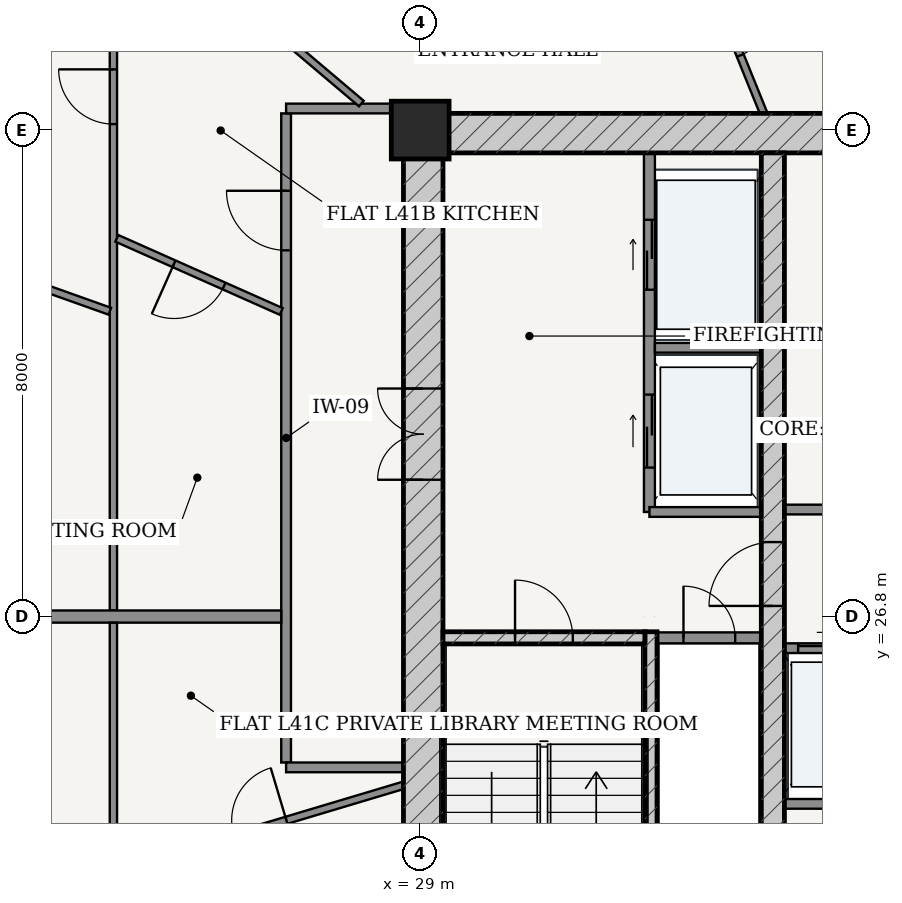
"""IFC4 building model, lengths in metres.
Left out: names, types, materials, properties, quantities, classifications, styles, units other than length and angle.
Written with IfcOpenShell. Run it as: python <this file> out.ifc"""

import sys

from ifc_helpers import new_model, si_unit, direction, frame, frame_2d, origin, origin_2d, place, context, subcontext, project, spatial, rectangle, extrude, source, transform, mapped, element, fill, save


model = new_model("IFC4")
c1 = context("Model", 3, precision=1e-05, world=origin(), true_north=direction((-0.2419218956, 0.970295726276)))
c2 = subcontext(c1, "Body", "Model", "MODEL_VIEW")
j1 = project(units=[si_unit("LENGTHUNIT", "METRE"), si_unit("PLANEANGLEUNIT", "RADIAN")], contexts=[c1])
p1 = place(None, origin())
s1 = spatial("IfcSite", under=j1, at=p1, CompositionType="ELEMENT")
p2 = place(p1, origin())
s2 = spatial("IfcBuilding", under=s1, at=p2, CompositionType="ELEMENT")
p3 = place(p2, frame((0.0, 0.0, 157.0)))
s3 = spatial("IfcBuildingStorey", under=s2, at=p3, CompositionType="ELEMENT", Elevation=157.0)
p4 = place(p3, frame((29.0, 34.8, 0.0), z_axis=(0.0, 0.0, 1.0), x_axis=(1.0, 0.0, 0.0)))
e1 = element("IfcColumn", 1, at=p4, inside=s3, PredefinedType="COLUMN", context=c2, shape_type="SweptSolid", body=[
    extrude(rectangle(XDim=0.95, YDim=0.95, at=origin_2d()), origin(), (0.0, 0.0, 1.0), 3.6),
])
p5 = place(p3, frame((28.725, 34.75, 0.0), z_axis=(0.0, 0.0, 1.0), x_axis=(1.0, 0.0, 0.0)))
e2 = element("IfcWall", 2, at=p5, inside=s3, PredefinedType="SHEAR", context=c2, shape_type="SweptSolid", body=[
    extrude(rectangle(XDim=18.55, YDim=0.65, at=frame_2d((9.275, 0.0))), origin(), (0.0, 0.0, 1.0), 3.33),
])
p6 = place(p3, frame((29.05, 19.175, 0.0), z_axis=(0.0, 0.0, 1.0), x_axis=(0.0, 1.0, 0.0)))
e3 = element("IfcWall", 3, at=p6, inside=s3, PredefinedType="SHEAR", context=c2, shape_type="SweptSolid", body=[
    extrude(rectangle(XDim=15.25, YDim=0.65, at=frame_2d((7.625, 0.0))), origin(), (0.0, 0.0, 1.0), 3.33),
])
p7 = place(p6, frame((9.875, 0.0, 0.0)))
e4 = element("IfcOpeningElement", 4, at=p7, cuts=e3, PredefinedType="OPENING", context=c2, shape_type="SweptSolid", body=[
    extrude(rectangle(XDim=1.5, YDim=2.2, at=frame_2d((0.75, 1.1))), frame((0.0, 0.335, 0.0), z_axis=(0.0, -1.0, 0.0), x_axis=(1.0, 0.0, 0.0)), (0.0, 0.0, 1.0), 0.67),
])
p8 = place(p3, frame((32.795, 19.175, 0.0), z_axis=(0.0, 0.0, 1.0), x_axis=(0.0, 1.0, 0.0)))
e5 = element("IfcWall", 5, at=p8, inside=s3, PredefinedType="SOLIDWALL", context=c2, shape_type="SweptSolid", body=[
    extrude(rectangle(XDim=7.375, YDim=0.2, at=frame_2d((3.688, 0.0))), origin(), (0.0, 0.0, 1.0), 3.33),
])
p9 = place(p3, frame((29.375, 26.45, 0.0), z_axis=(0.0, 0.0, 1.0), x_axis=(1.0, 0.0, 0.0)))
e6 = element("IfcWall", 6, at=p9, inside=s3, PredefinedType="SOLIDWALL", context=c2, shape_type="SweptSolid", body=[
    extrude(rectangle(XDim=3.32, YDim=0.2, at=frame_2d((1.66, 0.0))), origin(), (0.0, 0.0, 1.0), 3.33),
])
p10 = place(p9, frame((1.185, 0.0, 0.0)))
e7 = element("IfcOpeningElement", 7, at=p10, cuts=e6, PredefinedType="OPENING", context=c2, shape_type="SweptSolid", body=[
    extrude(rectangle(XDim=0.95, YDim=2.15, at=frame_2d((0.475, 1.075))), frame((0.0, 0.11, 0.0), z_axis=(0.0, -1.0, 0.0), x_axis=(1.0, 0.0, 0.0)), (0.0, 0.0, 1.0), 0.22),
])
p11 = place(p3, frame((34.8, 19.175, 0.0), z_axis=(0.0, 0.0, 1.0), x_axis=(0.0, 1.0, 0.0)))
e8 = element("IfcWall", 8, at=p11, inside=s3, PredefinedType="SHEAR", context=c2, shape_type="SweptSolid", body=[
    extrude(rectangle(XDim=15.25, YDim=0.38, at=frame_2d((7.625, 0.0))), origin(), (0.0, 0.0, 1.0), 3.33),
])
p12 = place(p11, frame((7.8, 0.0, 0.0)))
e9 = element("IfcOpeningElement", 9, at=p12, cuts=e8, PredefinedType="OPENING", context=c2, shape_type="SweptSolid", body=[
    extrude(rectangle(XDim=1.05, YDim=2.15, at=frame_2d((0.525, 1.075))), frame((0.0, 0.2, 0.0), z_axis=(0.0, -1.0, 0.0), x_axis=(1.0, 0.0, 0.0)), (0.0, 0.0, 1.0), 0.4),
])
p13 = place(p3, frame((32.9, 26.45, 0.0), z_axis=(0.0, 0.0, 1.0), x_axis=(1.0, 0.0, 0.0)))
e10 = element("IfcWall", 10, at=p13, inside=s3, PredefinedType="PARTITIONING", context=c2, shape_type="SweptSolid", body=[
    extrude(rectangle(XDim=1.71, YDim=0.18, at=frame_2d((0.855, 0.0))), origin(), (0.0, 0.0, 1.0), 3.33),
])
p14 = place(p13, frame((0.43, 0.0, 0.0)))
e11 = element("IfcOpeningElement", 11, at=p14, cuts=e10, PredefinedType="OPENING", context=c2, shape_type="SweptSolid", body=[
    extrude(rectangle(XDim=0.85, YDim=2.1, at=frame_2d((0.425, 1.05))), frame((0.0, 0.1, 0.0), z_axis=(0.0, -1.0, 0.0), x_axis=(1.0, 0.0, 0.0)), (0.0, 0.0, 1.0), 0.2),
])
p15 = place(p3, frame((32.77, 28.52, 0.0), z_axis=(0.0, 0.0, 1.0), x_axis=(0.0, 1.0, 0.0)))
e12 = element("IfcWall", 12, at=p15, inside=s3, PredefinedType="PARTITIONING", context=c2, shape_type="SweptSolid", body=[
    extrude(rectangle(XDim=5.905, YDim=0.18, at=frame_2d((2.953, 0.0))), origin(), (0.0, 0.0, 1.0), 3.33),
])
p16 = place(p15, frame((3.655, 0.0, 0.0)))
e13 = element("IfcOpeningElement", 13, at=p16, cuts=e12, PredefinedType="OPENING", context=c2, shape_type="SweptSolid", body=[
    extrude(rectangle(XDim=1.15, YDim=2.2, at=frame_2d((0.575, 1.1))), frame((0.0, 0.1, 0.0), z_axis=(0.0, -1.0, 0.0), x_axis=(1.0, 0.0, 0.0)), (0.0, 0.0, 1.0), 0.2),
])
p17 = place(p15, frame((0.73, 0.0, 0.0)))
e14 = element("IfcOpeningElement", 14, at=p17, cuts=e12, PredefinedType="OPENING", context=c2, shape_type="SweptSolid", body=[
    extrude(rectangle(XDim=1.2, YDim=2.25, at=frame_2d((0.6, 1.125))), frame((0.0, 0.1, 0.0), z_axis=(0.0, -1.0, 0.0), x_axis=(1.0, 0.0, 0.0)), (0.0, 0.0, 1.0), 0.2),
])
p18 = place(p3, frame((32.86, 31.22, 0.0), z_axis=(0.0, 0.0, 1.0), x_axis=(1.0, 0.0, 0.0)))
e15 = element("IfcWall", 15, at=p18, inside=s3, PredefinedType="PARTITIONING", context=c2, shape_type="SweptSolid", body=[
    extrude(rectangle(XDim=1.75, YDim=0.16, at=frame_2d((0.875, 0.0))), origin(), (0.0, 0.0, 1.0), 3.33),
])
p19 = place(p3, frame((32.77, 28.52, 0.0), z_axis=(0.0, 0.0, 1.0), x_axis=(1.0, 0.0, 0.0)))
e16 = element("IfcWall", 16, at=p19, inside=s3, PredefinedType="PARTITIONING", context=c2, shape_type="SweptSolid", body=[
    extrude(rectangle(XDim=1.84, YDim=0.16, at=frame_2d((0.92, 0.0))), origin(), (0.0, 0.0, 1.0), 3.33),
])
p20 = place(p3, frame((34.99, 28.56, 0.0), z_axis=(0.0, 0.0, 1.0), x_axis=(1.0, 0.0, 0.0)))
e17 = element("IfcWall", 17, at=p20, inside=s3, PredefinedType="PARTITIONING", context=c2, shape_type="SweptSolid", body=[
    extrude(rectangle(XDim=6.02, YDim=0.16, at=frame_2d((3.01, 0.0))), origin(), (0.0, 0.0, 1.0), 3.33),
])
p21 = place(p20, frame((2.585, 0.0, 0.0)))
e18 = element("IfcOpeningElement", 18, at=p21, cuts=e17, PredefinedType="OPENING", context=c2, shape_type="SweptSolid", body=[
    extrude(rectangle(XDim=0.85, YDim=2.1, at=frame_2d((0.425, 1.05))), frame((0.0, 0.09, 0.0), z_axis=(0.0, -1.0, 0.0), x_axis=(1.0, 0.0, 0.0)), (0.0, 0.0, 1.0), 0.18),
])
p22 = place(p3, frame((34.99, 26.28, 0.0), z_axis=(0.0, 0.0, 1.0), x_axis=(1.0, 0.0, 0.0)))
e19 = element("IfcWall", 19, at=p22, inside=s3, PredefinedType="PARTITIONING", context=c2, shape_type="SweptSolid", body=[
    extrude(rectangle(XDim=6.02, YDim=0.16, at=frame_2d((3.01, 0.0))), origin(), (0.0, 0.0, 1.0), 3.33),
])
p23 = place(p22, frame((0.225, 0.0, 0.0)))
e20 = element("IfcOpeningElement", 20, at=p23, cuts=e19, PredefinedType="OPENING", context=c2, shape_type="SweptSolid", body=[
    extrude(rectangle(XDim=1.1, YDim=2.2, at=frame_2d((0.55, 1.1))), frame((0.0, 0.09, 0.0), z_axis=(0.0, -1.0, 0.0), x_axis=(1.0, 0.0, 0.0)), (0.0, 0.0, 1.0), 0.18),
])
p24 = place(p22, frame((1.705, 0.0, 0.0)))
e21 = element("IfcOpeningElement", 21, at=p24, cuts=e19, PredefinedType="OPENING", context=c2, shape_type="SweptSolid", body=[
    extrude(rectangle(XDim=1.1, YDim=2.2, at=frame_2d((0.55, 1.1))), frame((0.0, 0.09, 0.0), z_axis=(0.0, -1.0, 0.0), x_axis=(1.0, 0.0, 0.0)), (0.0, 0.0, 1.0), 0.18),
])
p25 = place(p3, frame((34.99, 23.72, 0.0), z_axis=(0.0, 0.0, 1.0), x_axis=(1.0, 0.0, 0.0)))
e22 = element("IfcWall", 22, at=p25, inside=s3, PredefinedType="PARTITIONING", context=c2, shape_type="SweptSolid", body=[
    extrude(rectangle(XDim=6.02, YDim=0.16, at=frame_2d((3.01, 0.0))), origin(), (0.0, 0.0, 1.0), 3.33),
])
p26 = place(p3, frame((26.795, 24.4, 0.0), z_axis=(0.0, 0.0, 1.0), x_axis=(0.0, 1.0, 0.0)))
e23 = element("IfcWall", 23, at=p26, inside=s3, PredefinedType="PARTITIONING", context=c2, shape_type="SweptSolid", body=[
    extrude(rectangle(XDim=10.675, YDim=0.16, at=frame_2d((5.337, 0.0))), origin(), (0.0, 0.0, 1.0), 2.776),
])
p27 = place(p26, frame((8.422, 0.0, 0.0)))
e24 = element("IfcOpeningElement", 24, at=p27, cuts=e23, PredefinedType="OPENING", context=c2, shape_type="SweptSolid", body=[
    extrude(rectangle(XDim=0.98, YDim=2.2, at=frame_2d((0.49, 1.1))), frame((0.0, 0.09, 0.0), z_axis=(0.0, -1.0, 0.0), x_axis=(1.0, 0.0, 0.0)), (0.0, 0.0, 1.0), 0.18),
])
p28 = place(p3, frame((26.795, 35.155, 0.0), z_axis=(0.0, 0.0, 1.0), x_axis=(1.0, 0.0, 0.0)))
e25 = element("IfcWall", 25, at=p28, inside=s3, PredefinedType="PARTITIONING", context=c2, shape_type="SweptSolid", body=[
    extrude(rectangle(XDim=1.93, YDim=0.16, at=frame_2d((0.965, 0.0))), origin(), (0.0, 0.0, 1.0), 2.776),
])
p29 = place(p3, frame((26.795, 24.32, 0.0), z_axis=(0.0, 0.0, 1.0), x_axis=(1.0, 0.0, 0.0)))
e26 = element("IfcWall", 26, at=p29, inside=s3, PredefinedType="PARTITIONING", context=c2, shape_type="SweptSolid", body=[
    extrude(rectangle(XDim=1.93, YDim=0.16, at=frame_2d((0.965, 0.0))), origin(), (0.0, 0.0, 1.0), 3.33),
])
p30 = place(p3, frame((23.955, 26.902, 0.0), z_axis=(0.0, 0.0, 1.0), x_axis=(0.0, 1.0, 0.0)))
e27 = element("IfcWall", 27, at=p30, inside=s3, PredefinedType="PARTITIONING", context=c2, shape_type="SweptSolid", body=[
    extrude(rectangle(XDim=11.093, YDim=0.12, at=frame_2d((5.546, 0.0))), origin(), (0.0, 0.0, 1.0), 2.776),
])
p31 = place(p30, frame((7.997, 0.0, 0.0)))
e28 = element("IfcOpeningElement", 28, at=p31, cuts=e27, PredefinedType="OPENING", context=c2, shape_type="SweptSolid", body=[
    extrude(rectangle(XDim=0.9, YDim=2.15, at=frame_2d((0.45, 1.075))), frame((0.0, 0.07, 0.0), z_axis=(0.0, -1.0, 0.0), x_axis=(1.0, 0.0, 0.0)), (0.0, 0.0, 1.0), 0.14),
])
p32 = place(p3, frame((23.896, 31.821, 0.0), z_axis=(0.0, 0.0, 1.0), x_axis=(-0.942072876428, 0.335408251983, 0.0)))
e29 = element("IfcWall", 29, at=p32, inside=s3, PredefinedType="PARTITIONING", context=c2, shape_type="SweptSolid", body=[
    extrude(rectangle(XDim=8.7, YDim=0.12, at=frame_2d((4.35, 0.0))), origin(), (0.0, 0.0, 1.0), 2.846),
])
p33 = place(p32, frame((3.9, 0.0, 0.0)))
e30 = element("IfcOpeningElement", 30, at=p33, cuts=e29, PredefinedType="OPENING", context=c2, shape_type="SweptSolid", body=[
    extrude(rectangle(XDim=0.9, YDim=2.15, at=frame_2d((0.45, 1.075))), frame((0.0, 0.07, 0.0), z_axis=(0.0, -1.0, 0.0), x_axis=(1.0, 0.0, 0.0)), (0.0, 0.0, 1.0), 0.14),
])
p34 = place(p3, frame((34.649, 35.075, 0.0), z_axis=(0.0, 0.0, 1.0), x_axis=(-0.37535719187, 0.926880239573, 0.0)))
e31 = element("IfcWall", 31, at=p34, inside=s3, PredefinedType="PARTITIONING", context=c2, shape_type="SweptSolid", body=[
    extrude(rectangle(XDim=2.916, YDim=0.12, at=frame_2d((1.458, 0.0))), origin(), (0.0, 0.0, 1.0), 3.33),
])
p35 = place(p34, frame((1.028, 0.0, 0.0)))
e32 = element("IfcOpeningElement", 32, at=p35, cuts=e31, PredefinedType="OPENING", context=c2, shape_type="SweptSolid", body=[
    extrude(rectangle(XDim=0.86, YDim=2.15, at=frame_2d((0.43, 1.075))), frame((0.0, 0.07, 0.0), z_axis=(0.0, -1.0, 0.0), x_axis=(1.0, 0.0, 0.0)), (0.0, 0.0, 1.0), 0.14),
])
p36 = place(p3, frame((28.032, 35.236, 0.0), z_axis=(0.0, 0.0, 1.0), x_axis=(-0.763324664245, 0.646015059388, 0.0)))
e33 = element("IfcWall", 33, at=p36, inside=s3, PredefinedType="PARTITIONING", context=c2, shape_type="SweptSolid", body=[
    extrude(rectangle(XDim=4.208, YDim=0.12, at=frame_2d((2.104, 0.0))), origin(), (0.0, 0.0, 1.0), 3.005),
])
p37 = place(p36, frame((1.654, 0.0, 0.0)))
e34 = element("IfcOpeningElement", 34, at=p37, cuts=e33, PredefinedType="OPENING", context=c2, shape_type="SweptSolid", body=[
    extrude(rectangle(XDim=0.9, YDim=2.15, at=frame_2d((0.45, 1.075))), frame((0.0, 0.07, 0.0), z_axis=(0.0, -1.0, 0.0), x_axis=(1.0, 0.0, 0.0)), (0.0, 0.0, 1.0), 0.14),
])
p38 = place(p3, frame((26.715, 31.818, 0.0), z_axis=(0.0, 0.0, 1.0), x_axis=(-0.91376049718, 0.406253312347, 0.0)))
e35 = element("IfcWall", 35, at=p38, inside=s3, PredefinedType="PARTITIONING", context=c2, shape_type="SweptSolid", body=[
    extrude(rectangle(XDim=2.958, YDim=0.12, at=frame_2d((1.479, 0.0))), origin(), (0.0, 0.0, 1.0), 3.33),
])
p39 = place(p38, frame((1.029, 0.0, 0.0)))
e36 = element("IfcOpeningElement", 36, at=p39, cuts=e35, PredefinedType="OPENING", context=c2, shape_type="SweptSolid", body=[
    extrude(rectangle(XDim=0.9, YDim=2.15, at=frame_2d((0.45, 1.075))), frame((0.0, 0.07, 0.0), z_axis=(0.0, -1.0, 0.0), x_axis=(1.0, 0.0, 0.0)), (0.0, 0.0, 1.0), 0.14),
])
p40 = place(p3, frame((26.715, 26.8, 0.0), z_axis=(0.0, 0.0, 1.0), x_axis=(-1.0, 0.0, 0.0)))
e37 = element("IfcWall", 37, at=p40, inside=s3, PredefinedType="PARTITIONING", context=c2, shape_type="SweptSolid", body=[
    extrude(rectangle(XDim=12.855, YDim=0.2, at=frame_2d((6.427, 0.0))), origin(), (0.0, 0.0, 1.0), 2.846),
])
p41 = place(p3, frame((23.955, 21.48, 0.0), z_axis=(0.0, 0.0, 1.0), x_axis=(0.0, 1.0, 0.0)))
e38 = element("IfcWall", 38, at=p41, inside=s3, PredefinedType="PARTITIONING", context=c2, shape_type="SweptSolid", body=[
    extrude(rectangle(XDim=5.218, YDim=0.12, at=frame_2d((2.609, 0.0))), origin(), (0.0, 0.0, 1.0), 2.776),
])
p42 = place(p3, frame((28.723, 24.025, 0.0), z_axis=(0.0, 0.0, 1.0), x_axis=(-0.958046115523, -0.286614096882, 0.0)))
e39 = element("IfcWall", 39, at=p42, inside=s3, PredefinedType="PARTITIONING", context=c2, shape_type="SweptSolid", body=[
    extrude(rectangle(XDim=4.915, YDim=0.12, at=frame_2d((2.458, 0.0))), origin(), (0.0, 0.0, 1.0), 3.33),
])
p43 = place(p42, frame((2.007, 0.0, 0.0)))
e40 = element("IfcOpeningElement", 40, at=p43, cuts=e39, PredefinedType="OPENING", context=c2, shape_type="SweptSolid", body=[
    extrude(rectangle(XDim=0.9, YDim=2.15, at=frame_2d((0.45, 1.075))), frame((0.0, 0.07, 0.0), z_axis=(0.0, -1.0, 0.0), x_axis=(1.0, 0.0, 0.0)), (0.0, 0.0, 1.0), 0.14),
])
m1 = source(origin(), c2, "Body", "SweptSolid", [
    extrude(rectangle(XDim=1.5, YDim=2.2, at=frame_2d((0.75, 1.1))), frame((0.0, 0.025, 0.0), z_axis=(0.0, -1.0, 0.0), x_axis=(1.0, 0.0, 0.0)), (0.0, 0.0, 1.0), 0.05),
])
p44 = place(p7, origin())
e41 = element("IfcDoor", 41, at=p44, inside=s3, OperationType="DOUBLE_DOOR_SINGLE_SWING", PredefinedType="DOOR", context=c2, shape_type="MappedRepresentation", body=[
    mapped(m1, transform((0.0, 0.0, 0.0), scale=1.0)),
])
fill(e4, e41)
m2 = source(origin(), c2, "Body", "SweptSolid", [
    extrude(rectangle(XDim=1.05, YDim=2.15, at=frame_2d((0.525, 1.075))), frame((0.0, 0.025, 0.0), z_axis=(0.0, -1.0, 0.0), x_axis=(1.0, 0.0, 0.0)), (0.0, 0.0, 1.0), 0.05),
])
p45 = place(p12, origin())
e42 = element("IfcDoor", 42, at=p45, inside=s3, OperationType="SINGLE_SWING_LEFT", PredefinedType="DOOR", context=c2, shape_type="MappedRepresentation", body=[
    mapped(m2, transform((0.0, 0.0, 0.0), scale=1.0)),
])
fill(e9, e42)
m3 = source(origin(), c2, "Body", "SweptSolid", [
    extrude(rectangle(XDim=0.95, YDim=2.15, at=frame_2d((0.475, 1.075))), frame((0.0, 0.025, 0.0), z_axis=(0.0, -1.0, 0.0), x_axis=(1.0, 0.0, 0.0)), (0.0, 0.0, 1.0), 0.05),
])
p46 = place(p10, origin())
e43 = element("IfcDoor", 43, at=p46, inside=s3, OperationType="SINGLE_SWING_LEFT", PredefinedType="DOOR", context=c2, shape_type="MappedRepresentation", body=[
    mapped(m3, transform((0.0, 0.0, 0.0), scale=1.0)),
])
fill(e7, e43)
m4 = source(origin(), c2, "Body", "SweptSolid", [
    extrude(rectangle(XDim=0.85, YDim=2.1, at=frame_2d((0.425, 1.05))), frame((0.0, 0.025, 0.0), z_axis=(0.0, -1.0, 0.0), x_axis=(1.0, 0.0, 0.0)), (0.0, 0.0, 1.0), 0.05),
])
p47 = place(p14, origin())
e44 = element("IfcDoor", 44, at=p47, inside=s3, OperationType="SINGLE_SWING_LEFT", PredefinedType="DOOR", context=c2, shape_type="MappedRepresentation", body=[
    mapped(m4, transform((0.0, 0.0, 0.0), scale=1.0)),
])
fill(e11, e44)
m5 = source(origin(), c2, "Body", "SweptSolid", [
    extrude(rectangle(XDim=1.15, YDim=2.2, at=frame_2d((0.575, 1.1))), frame((0.0, 0.025, 0.0), z_axis=(0.0, -1.0, 0.0), x_axis=(1.0, 0.0, 0.0)), (0.0, 0.0, 1.0), 0.05),
])
p48 = place(p16, origin())
e45 = element("IfcDoor", 45, at=p48, inside=s3, OperationType="DOUBLE_DOOR_SLIDING", PredefinedType="DOOR", context=c2, shape_type="MappedRepresentation", body=[
    mapped(m5, transform((0.0, 0.0, 0.0), scale=1.0)),
])
fill(e13, e45)
m6 = source(origin(), c2, "Body", "SweptSolid", [
    extrude(rectangle(XDim=1.2, YDim=2.25, at=frame_2d((0.6, 1.125))), frame((0.0, 0.025, 0.0), z_axis=(0.0, -1.0, 0.0), x_axis=(1.0, 0.0, 0.0)), (0.0, 0.0, 1.0), 0.05),
])
p49 = place(p17, origin())
e46 = element("IfcDoor", 46, at=p49, inside=s3, OperationType="DOUBLE_DOOR_SLIDING", PredefinedType="DOOR", context=c2, shape_type="MappedRepresentation", body=[
    mapped(m6, transform((0.0, 0.0, 0.0), scale=1.0)),
])
fill(e14, e46)
m7 = source(origin(), c2, "Body", "SweptSolid", [
    extrude(rectangle(XDim=1.1, YDim=2.2, at=frame_2d((0.55, 1.1))), frame((0.0, 0.025, 0.0), z_axis=(0.0, -1.0, 0.0), x_axis=(1.0, 0.0, 0.0)), (0.0, 0.0, 1.0), 0.05),
])
p50 = place(p23, origin())
e47 = element("IfcDoor", 47, at=p50, inside=s3, OperationType="DOUBLE_DOOR_SLIDING", PredefinedType="DOOR", context=c2, shape_type="MappedRepresentation", body=[
    mapped(m7, transform((0.0, 0.0, 0.0), scale=1.0)),
])
fill(e20, e47)
m8 = source(origin(), c2, "Body", "SweptSolid", [
    extrude(rectangle(XDim=0.98, YDim=2.2, at=frame_2d((0.49, 1.1))), frame((0.0, 0.025, 0.0), z_axis=(0.0, -1.0, 0.0), x_axis=(1.0, 0.0, 0.0)), (0.0, 0.0, 1.0), 0.05),
])
p51 = place(p27, origin())
e48 = element("IfcDoor", 48, at=p51, inside=s3, OperationType="SINGLE_SWING_RIGHT", PredefinedType="DOOR", context=c2, shape_type="MappedRepresentation", body=[
    mapped(m8, transform((0.0, 0.0, 0.0), scale=1.0)),
])
fill(e24, e48)
m9 = source(origin(), c2, "Body", "SweptSolid", [
    extrude(rectangle(XDim=0.9, YDim=2.15, at=frame_2d((0.45, 1.075))), frame((0.0, 0.025, 0.0), z_axis=(0.0, -1.0, 0.0), x_axis=(1.0, 0.0, 0.0)), (0.0, 0.0, 1.0), 0.05),
])
p52 = place(p39, origin())
e49 = element("IfcDoor", 49, at=p52, inside=s3, OperationType="SINGLE_SWING_RIGHT", PredefinedType="DOOR", context=c2, shape_type="MappedRepresentation", body=[
    mapped(m9, transform((0.0, 0.0, 0.0), scale=1.0)),
])
fill(e36, e49)
p53 = place(p31, origin())
e50 = element("IfcDoor", 50, at=p53, inside=s3, OperationType="SINGLE_SWING_RIGHT", PredefinedType="DOOR", context=c2, shape_type="MappedRepresentation", body=[
    mapped(m9, transform((0.0, 0.0, 0.0), scale=1.0)),
])
fill(e28, e50)
m10 = source(origin(), c2, "Body", "SweptSolid", [
    extrude(rectangle(XDim=0.86, YDim=2.15, at=frame_2d((0.43, 1.075))), frame((0.0, 0.025, 0.0), z_axis=(0.0, -1.0, 0.0), x_axis=(1.0, 0.0, 0.0)), (0.0, 0.0, 1.0), 0.05),
])
p54 = place(p35, frame((0.86, 0.0, 0.0), z_axis=(0.0, 0.0, 1.0), x_axis=(-1.0, 0.0, 0.0)))
e51 = element("IfcDoor", 51, at=p54, inside=s3, OperationType="SINGLE_SWING_LEFT", PredefinedType="DOOR", context=c2, shape_type="MappedRepresentation", body=[
    mapped(m10, transform((0.0, 0.0, 0.0), scale=1.0)),
])
fill(e32, e51)
p55 = place(p43, frame((0.9, 0.0, 0.0), z_axis=(0.0, 0.0, 1.0), x_axis=(-1.0, 0.0, 0.0)))
e52 = element("IfcDoor", 52, at=p55, inside=s3, OperationType="SINGLE_SWING_RIGHT", PredefinedType="DOOR", context=c2, shape_type="MappedRepresentation", body=[
    mapped(m9, transform((0.0, 0.0, 0.0), scale=1.0)),
])
fill(e40, e52)
save(model, sys.argv[1])
